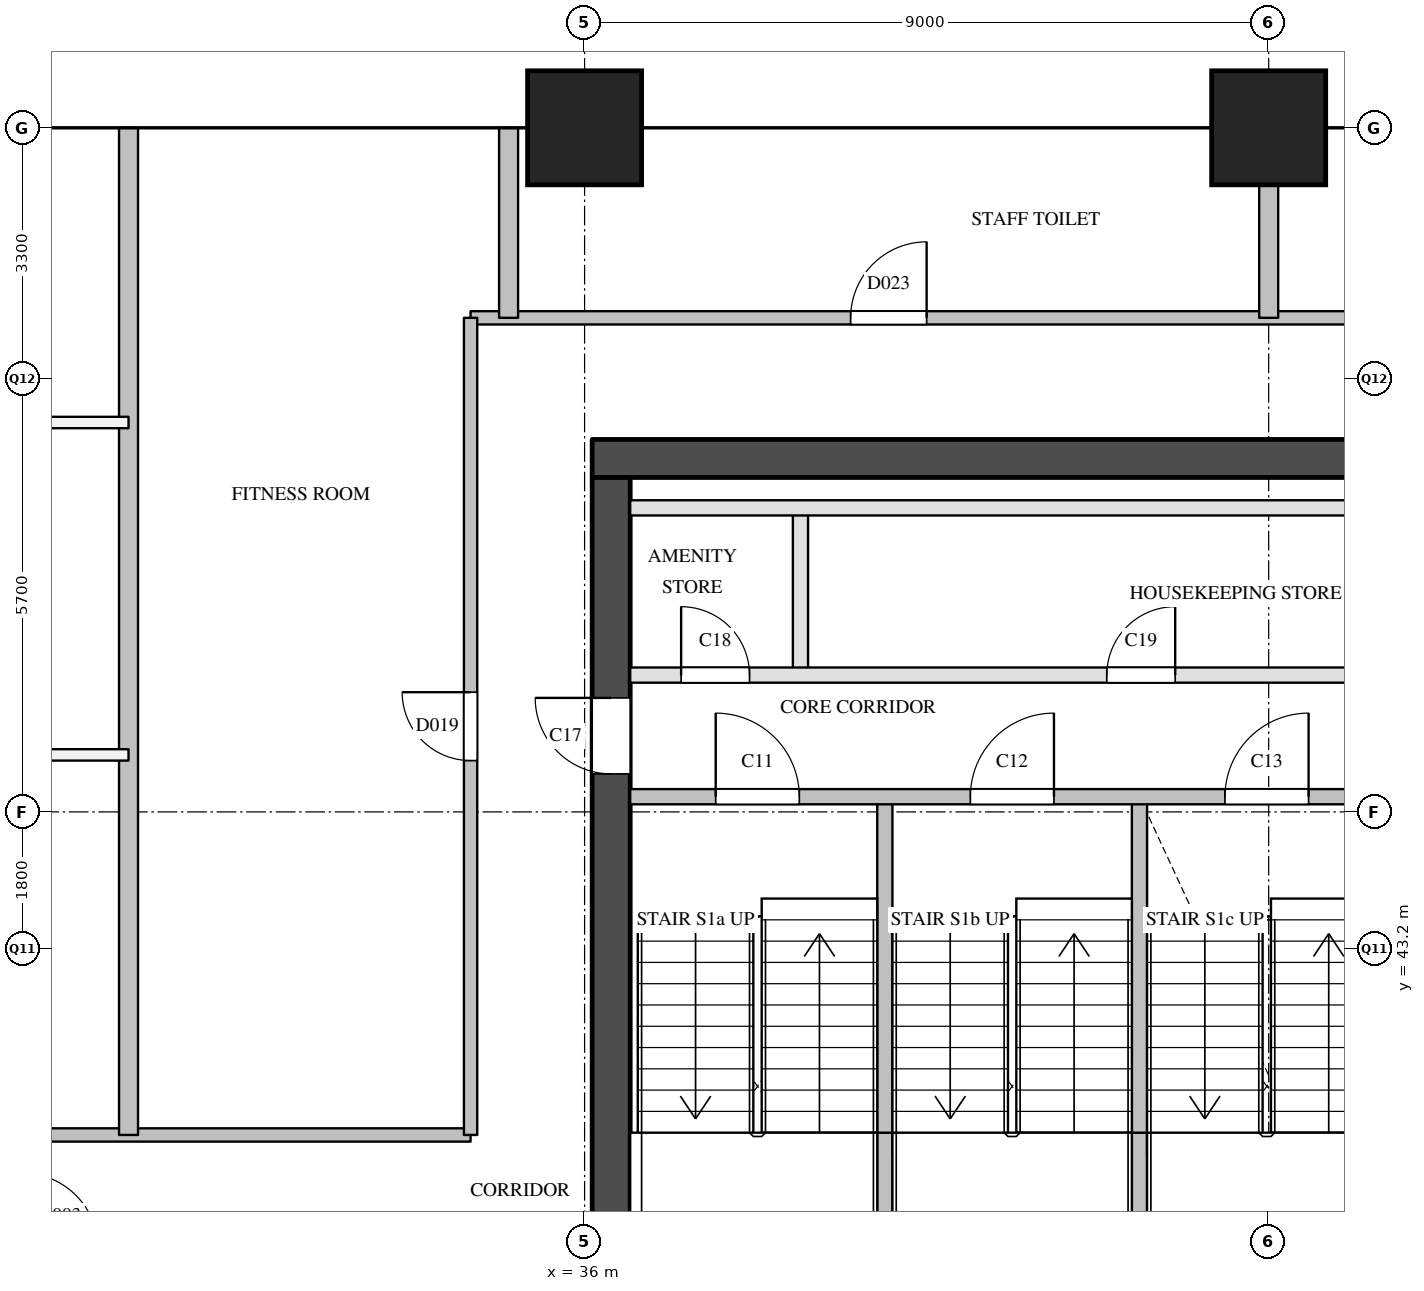
"""IFC4 building model, lengths in metres.
Left out: names, types, materials, properties, quantities, classifications, styles, units other than length and angle.
Written with IfcOpenShell. Run it as: python <this file> out.ifc"""

import sys

from ifc_helpers import new_model, si_unit, direction, frame, frame_2d, origin, origin_2d, place, context, subcontext, project, spatial, rectangle, extrude, element, fill, save


model = new_model("IFC4")
c1 = context("Model", 3, precision=1e-05, world=origin(), true_north=direction((0.0, 1.0)))
c2 = subcontext(c1, "Body", "Model", "MODEL_VIEW")
j1 = project(units=[si_unit("LENGTHUNIT", "METRE"), si_unit("PLANEANGLEUNIT", "RADIAN")], contexts=[c1])
p1 = place(None, origin())
s1 = spatial("IfcSite", under=j1, at=p1, CompositionType="ELEMENT")
p2 = place(p1, origin())
s2 = spatial("IfcBuilding", under=s1, at=p2, CompositionType="ELEMENT")
p3 = place(p2, frame((0.0, 0.0, 134.9)))
s3 = spatial("IfcBuildingStorey", under=s2, at=p3, CompositionType="ELEMENT", Elevation=134.9)
for number, where, z_axis, x_axis in (
    (1, (36.0, 54.0, 0.0), (0.0, 0.0, 1.0), (1.0, 0.0, 0.0)),
    (2, (45.0, 54.0, 0.0), (0.0, 0.0, 1.0), (1.0, 0.0, 0.0)),
):
    element("IfcColumn", number, at=place(p3, frame(where, z_axis=z_axis, x_axis=x_axis)), inside=s3, PredefinedType="COLUMN", context=c2, shape_type="SweptSolid", body=[
        extrude(rectangle(XDim=1.5, YDim=1.5, at=origin_2d()), origin(), (0.0, 0.0, 1.0), 3.9),
    ])
p4 = place(p3, frame((36.1, 49.65, 0.0), z_axis=(0.0, 0.0, 1.0), x_axis=(1.0, 0.0, 0.0)))
e3 = element("IfcWall", 3, at=p4, inside=s3, PredefinedType="SHEAR", context=c2, shape_type="SweptSolid", body=[
    extrude(rectangle(XDim=12.2, YDim=0.5, at=frame_2d((6.1, 0.0))), origin(), (0.0, 0.0, 1.0), 3.6),
])
p5 = place(p3, frame((36.35, 29.1, 0.0), z_axis=(0.0, 0.0, 1.0), x_axis=(0.0, 1.0, 0.0)))
e4 = element("IfcWall", 4, at=p5, inside=s3, PredefinedType="SHEAR", context=c2, shape_type="SweptSolid", body=[
    extrude(rectangle(XDim=20.3, YDim=0.5, at=frame_2d((10.15, 0.0))), origin(), (0.0, 0.0, 1.0), 3.6),
])
p6 = place(p5, frame((3.6, 0.0, 0.0)))
e5 = element("IfcOpeningElement", 5, at=p6, cuts=e4, PredefinedType="OPENING", context=c2, shape_type="SweptSolid", body=[
    extrude(rectangle(XDim=1.8, YDim=2.1, at=frame_2d((0.9, 1.05))), frame((0.0, 0.26, 0.0), z_axis=(0.0, -1.0, 0.0), x_axis=(1.0, 0.0, 0.0)), (0.0, 0.0, 1.0), 0.52),
])
p7 = place(p5, frame((16.4, 0.0, 0.0)))
e6 = element("IfcOpeningElement", 6, at=p7, cuts=e4, PredefinedType="OPENING", context=c2, shape_type="SweptSolid", body=[
    extrude(rectangle(XDim=1.0, YDim=2.1, at=frame_2d((0.5, 1.05))), frame((0.0, 0.26, 0.0), z_axis=(0.0, -1.0, 0.0), x_axis=(1.0, 0.0, 0.0)), (0.0, 0.0, 1.0), 0.52),
])
p8 = place(p3, frame((38.84, 46.8, 0.0), z_axis=(0.0, 0.0, 1.0), x_axis=(0.0, 1.0, 0.0)))
e7 = element("IfcWall", 7, at=p8, inside=s3, PredefinedType="PARTITIONING", context=c2, shape_type="SweptSolid", body=[
    extrude(rectangle(XDim=2.2, YDim=0.2, at=frame_2d((1.1, 0.0))), origin(), (0.0, 0.0, 1.0), 3.6),
])
p9 = place(p3, frame((39.95, 39.0, 0.0), z_axis=(0.0, 0.0, 1.0), x_axis=(0.0, 1.0, 0.0)))
e8 = element("IfcWall", 8, at=p9, inside=s3, PredefinedType="SOLIDWALL", context=c2, shape_type="SweptSolid", body=[
    extrude(rectangle(XDim=1.78, YDim=0.2, at=frame_2d((0.89, 0.0))), origin(), (0.0, 0.0, 1.0), 3.6),
])
p10 = place(p3, frame((39.95, 40.78, 0.0), z_axis=(0.0, 0.0, 1.0), x_axis=(0.0, 1.0, 0.0)))
e9 = element("IfcWall", 9, at=p10, inside=s3, PredefinedType="SOLIDWALL", context=c2, shape_type="SweptSolid", body=[
    extrude(rectangle(XDim=4.42, YDim=0.2, at=frame_2d((2.21, 0.0))), origin(), (0.0, 0.0, 1.0), 3.6),
])
p11 = place(p3, frame((43.3, 39.0, 0.0), z_axis=(0.0, 0.0, 1.0), x_axis=(0.0, 1.0, 0.0)))
e10 = element("IfcWall", 10, at=p11, inside=s3, PredefinedType="SOLIDWALL", context=c2, shape_type="SweptSolid", body=[
    extrude(rectangle(XDim=1.78, YDim=0.2, at=frame_2d((0.89, 0.0))), origin(), (0.0, 0.0, 1.0), 3.6),
])
p12 = place(p3, frame((43.3, 40.78, 0.0), z_axis=(0.0, 0.0, 1.0), x_axis=(0.0, 1.0, 0.0)))
e11 = element("IfcWall", 11, at=p12, inside=s3, PredefinedType="SOLIDWALL", context=c2, shape_type="SweptSolid", body=[
    extrude(rectangle(XDim=4.42, YDim=0.2, at=frame_2d((2.21, 0.0))), origin(), (0.0, 0.0, 1.0), 3.6),
])
p13 = place(p3, frame((36.6, 45.2, 0.0), z_axis=(0.0, 0.0, 1.0), x_axis=(1.0, 0.0, 0.0)))
e12 = element("IfcWall", 12, at=p13, inside=s3, PredefinedType="SOLIDWALL", context=c2, shape_type="SweptSolid", body=[
    extrude(rectangle(XDim=10.05, YDim=0.2, at=frame_2d((5.025, 0.0))), origin(), (0.0, 0.0, 1.0), 3.6),
])
p14 = place(p13, frame((1.125, 0.0, 0.0)))
e13 = element("IfcOpeningElement", 13, at=p14, cuts=e12, PredefinedType="OPENING", context=c2, shape_type="SweptSolid", body=[
    extrude(rectangle(XDim=1.1, YDim=2.1, at=frame_2d((0.55, 1.05))), frame((0.0, 0.11, 0.0), z_axis=(0.0, -1.0, 0.0), x_axis=(1.0, 0.0, 0.0)), (0.0, 0.0, 1.0), 0.22),
])
p15 = place(p13, frame((4.475, 0.0, 0.0)))
e14 = element("IfcOpeningElement", 14, at=p15, cuts=e12, PredefinedType="OPENING", context=c2, shape_type="SweptSolid", body=[
    extrude(rectangle(XDim=1.1, YDim=2.1, at=frame_2d((0.55, 1.05))), frame((0.0, 0.11, 0.0), z_axis=(0.0, -1.0, 0.0), x_axis=(1.0, 0.0, 0.0)), (0.0, 0.0, 1.0), 0.22),
])
p16 = place(p13, frame((7.825, 0.0, 0.0)))
e15 = element("IfcOpeningElement", 15, at=p16, cuts=e12, PredefinedType="OPENING", context=c2, shape_type="SweptSolid", body=[
    extrude(rectangle(XDim=1.1, YDim=2.1, at=frame_2d((0.55, 1.05))), frame((0.0, 0.11, 0.0), z_axis=(0.0, -1.0, 0.0), x_axis=(1.0, 0.0, 0.0)), (0.0, 0.0, 1.0), 0.22),
])
p17 = place(p3, frame((36.6, 46.8, 0.0), z_axis=(0.0, 0.0, 1.0), x_axis=(1.0, 0.0, 0.0)))
e16 = element("IfcWall", 16, at=p17, inside=s3, PredefinedType="PARTITIONING", context=c2, shape_type="SweptSolid", body=[
    extrude(rectangle(XDim=11.2, YDim=0.2, at=frame_2d((5.6, 0.0))), origin(), (0.0, 0.0, 1.0), 3.6),
])
p18 = place(p17, frame((0.67, 0.0, 0.0)))
e17 = element("IfcOpeningElement", 17, at=p18, cuts=e16, PredefinedType="OPENING", context=c2, shape_type="SweptSolid", body=[
    extrude(rectangle(XDim=0.9, YDim=2.1, at=frame_2d((0.45, 1.05))), frame((0.0, 0.11, 0.0), z_axis=(0.0, -1.0, 0.0), x_axis=(1.0, 0.0, 0.0)), (0.0, 0.0, 1.0), 0.22),
])
p19 = place(p17, frame((6.27, 0.0, 0.0)))
e18 = element("IfcOpeningElement", 18, at=p19, cuts=e16, PredefinedType="OPENING", context=c2, shape_type="SweptSolid", body=[
    extrude(rectangle(XDim=0.9, YDim=2.1, at=frame_2d((0.45, 1.05))), frame((0.0, 0.11, 0.0), z_axis=(0.0, -1.0, 0.0), x_axis=(1.0, 0.0, 0.0)), (0.0, 0.0, 1.0), 0.22),
])
p20 = place(p3, frame((36.6, 49.0, 0.0), z_axis=(0.0, 0.0, 1.0), x_axis=(1.0, 0.0, 0.0)))
e19 = element("IfcWall", 19, at=p20, inside=s3, PredefinedType="PARTITIONING", context=c2, shape_type="SweptSolid", body=[
    extrude(rectangle(XDim=11.2, YDim=0.2, at=frame_2d((5.6, 0.0))), origin(), (0.0, 0.0, 1.0), 3.6),
])
p21 = place(p3, frame((19.5, 40.75, 0.0), z_axis=(0.0, 0.0, 1.0), x_axis=(1.0, 0.0, 0.0)))
e20 = element("IfcWall", 20, at=p21, inside=s3, PredefinedType="PARTITIONING", context=c2, shape_type="SweptSolid", body=[
    extrude(rectangle(XDim=15.0, YDim=0.175, at=frame_2d((7.5, 0.0))), origin(), (0.0, 0.0, 1.0), 2.6),
])
p22 = place(p21, frame((0.7, 0.0, 0.0)))
e21 = element("IfcOpeningElement", 21, at=p22, cuts=e20, PredefinedType="OPENING", context=c2, shape_type="SweptSolid", body=[
    extrude(rectangle(XDim=1.0, YDim=2.1, at=frame_2d((0.5, 1.05))), frame((0.0, 0.097, 0.0), z_axis=(0.0, -1.0, 0.0), x_axis=(1.0, 0.0, 0.0)), (0.0, 0.0, 1.0), 0.195),
])
p23 = place(p3, frame((34.5, 51.5, 0.0), z_axis=(0.0, 0.0, 1.0), x_axis=(1.0, 0.0, 0.0)))
e22 = element("IfcWall", 22, at=p23, inside=s3, PredefinedType="PARTITIONING", context=c2, shape_type="SweptSolid", body=[
    extrude(rectangle(XDim=15.4, YDim=0.175, at=frame_2d((7.7, 0.0))), origin(), (0.0, 0.0, 1.0), 3.6),
])
p24 = place(p23, frame((5.0, 0.0, 0.0)))
e23 = element("IfcOpeningElement", 23, at=p24, cuts=e22, PredefinedType="OPENING", context=c2, shape_type="SweptSolid", body=[
    extrude(rectangle(XDim=1.0, YDim=2.1, at=frame_2d((0.5, 1.05))), frame((0.0, 0.097, 0.0), z_axis=(0.0, -1.0, 0.0), x_axis=(1.0, 0.0, 0.0)), (0.0, 0.0, 1.0), 0.195),
])
p25 = place(p3, frame((34.5, 40.75, 0.0), z_axis=(0.0, 0.0, 1.0), x_axis=(0.0, 1.0, 0.0)))
e24 = element("IfcWall", 24, at=p25, inside=s3, PredefinedType="PARTITIONING", context=c2, shape_type="SweptSolid", body=[
    extrude(rectangle(XDim=10.75, YDim=0.175, at=frame_2d((5.375, 0.0))), origin(), (0.0, 0.0, 1.0), 3.6),
])
p26 = place(p25, frame((4.925, 0.0, 0.0)))
e25 = element("IfcOpeningElement", 25, at=p26, cuts=e24, PredefinedType="OPENING", context=c2, shape_type="SweptSolid", body=[
    extrude(rectangle(XDim=0.9, YDim=2.1, at=frame_2d((0.45, 1.05))), frame((0.0, 0.097, 0.0), z_axis=(0.0, -1.0, 0.0), x_axis=(1.0, 0.0, 0.0)), (0.0, 0.0, 1.0), 0.195),
])
p27 = place(p3, frame((21.9, 45.75, 0.0), z_axis=(0.0, 0.0, 1.0), x_axis=(1.0, 0.0, 0.0)))
e26 = element("IfcWall", 26, at=p27, inside=s3, PredefinedType="PARTITIONING", context=c2, shape_type="SweptSolid", body=[
    extrude(rectangle(XDim=8.1, YDim=0.15, at=frame_2d((4.05, 0.0))), origin(), (0.0, 0.0, 1.0), 2.6),
])
p28 = place(p27, frame((2.26, 0.0, 0.0)))
e27 = element("IfcOpeningElement", 27, at=p28, cuts=e26, PredefinedType="OPENING", context=c2, shape_type="SweptSolid", body=[
    extrude(rectangle(XDim=0.9, YDim=2.1, at=frame_2d((0.45, 1.05))), frame((0.0, 0.085, 0.0), z_axis=(0.0, -1.0, 0.0), x_axis=(1.0, 0.0, 0.0)), (0.0, 0.0, 1.0), 0.17),
])
p29 = place(p3, frame((21.9, 50.123, 0.0), z_axis=(0.0, 0.0, 1.0), x_axis=(1.0, 0.0, 0.0)))
e28 = element("IfcWall", 28, at=p29, inside=s3, PredefinedType="PARTITIONING", context=c2, shape_type="SweptSolid", body=[
    extrude(rectangle(XDim=8.1, YDim=0.15, at=frame_2d((4.05, 0.0))), origin(), (0.0, 0.0, 1.0), 2.6),
])
p30 = place(p29, frame((3.6, 0.0, 0.0)))
e29 = element("IfcOpeningElement", 29, at=p30, cuts=e28, PredefinedType="OPENING", context=c2, shape_type="SweptSolid", body=[
    extrude(rectangle(XDim=0.9, YDim=2.1, at=frame_2d((0.45, 1.05))), frame((0.0, 0.085, 0.0), z_axis=(0.0, -1.0, 0.0), x_axis=(1.0, 0.0, 0.0)), (0.0, 0.0, 1.0), 0.17),
])
p31 = place(p3, frame((30.0, 40.75, 0.0), z_axis=(0.0, 0.0, 1.0), x_axis=(0.0, 1.0, 0.0)))
e30 = element("IfcWall", 30, at=p31, inside=s3, PredefinedType="PARTITIONING", context=c2, shape_type="SweptSolid", body=[
    extrude(rectangle(XDim=13.25, YDim=0.25, at=frame_2d((6.625, 0.0))), origin(), (0.0, 0.0, 1.0), 2.6),
])
p32 = place(p3, frame((35.0, 51.5, 0.0), z_axis=(0.0, 0.0, 1.0), x_axis=(0.0, 1.0, 0.0)))
e31 = element("IfcWall", 31, at=p32, inside=s3, PredefinedType="PARTITIONING", context=c2, shape_type="SweptSolid", body=[
    extrude(rectangle(XDim=2.5, YDim=0.25, at=frame_2d((1.25, 0.0))), origin(), (0.0, 0.0, 1.0), 2.6),
])
p33 = place(p3, frame((45.0, 51.5, 0.0), z_axis=(0.0, 0.0, 1.0), x_axis=(0.0, 1.0, 0.0)))
e32 = element("IfcWall", 32, at=p33, inside=s3, PredefinedType="PARTITIONING", context=c2, shape_type="SweptSolid", body=[
    extrude(rectangle(XDim=2.5, YDim=0.25, at=frame_2d((1.25, 0.0))), origin(), (0.0, 0.0, 1.0), 3.6),
])
p34 = place(p14, origin())
e33 = element("IfcDoor", 33, at=p34, inside=s3, OperationType="SINGLE_SWING_LEFT", PredefinedType="DOOR", context=c2, shape_type="SweptSolid", body=[
    extrude(rectangle(XDim=1.1, YDim=2.1, at=frame_2d((0.55, 1.05))), frame((0.0, 0.025, 0.0), z_axis=(0.0, -1.0, 0.0), x_axis=(1.0, 0.0, 0.0)), (0.0, 0.0, 1.0), 0.05),
])
fill(e13, e33)
p35 = place(p15, origin())
e34 = element("IfcDoor", 34, at=p35, inside=s3, OperationType="SINGLE_SWING_RIGHT", PredefinedType="DOOR", context=c2, shape_type="SweptSolid", body=[
    extrude(rectangle(XDim=1.1, YDim=2.1, at=frame_2d((0.55, 1.05))), frame((0.0, 0.025, 0.0), z_axis=(0.0, -1.0, 0.0), x_axis=(1.0, 0.0, 0.0)), (0.0, 0.0, 1.0), 0.05),
])
fill(e14, e34)
p36 = place(p16, origin())
e35 = element("IfcDoor", 35, at=p36, inside=s3, OperationType="SINGLE_SWING_RIGHT", PredefinedType="DOOR", context=c2, shape_type="SweptSolid", body=[
    extrude(rectangle(XDim=1.1, YDim=2.1, at=frame_2d((0.55, 1.05))), frame((0.0, 0.025, 0.0), z_axis=(0.0, -1.0, 0.0), x_axis=(1.0, 0.0, 0.0)), (0.0, 0.0, 1.0), 0.05),
])
fill(e15, e35)
p37 = place(p7, origin())
e36 = element("IfcDoor", 36, at=p37, inside=s3, OperationType="SINGLE_SWING_RIGHT", PredefinedType="DOOR", context=c2, shape_type="SweptSolid", body=[
    extrude(rectangle(XDim=1.0, YDim=2.1, at=frame_2d((0.5, 1.05))), frame((0.0, 0.025, 0.0), z_axis=(0.0, -1.0, 0.0), x_axis=(1.0, 0.0, 0.0)), (0.0, 0.0, 1.0), 0.05),
])
fill(e6, e36)
p38 = place(p18, origin())
e37 = element("IfcDoor", 37, at=p38, inside=s3, OperationType="SINGLE_SWING_LEFT", PredefinedType="DOOR", context=c2, shape_type="SweptSolid", body=[
    extrude(rectangle(XDim=0.9, YDim=2.1, at=frame_2d((0.45, 1.05))), frame((0.0, 0.025, 0.0), z_axis=(0.0, -1.0, 0.0), x_axis=(1.0, 0.0, 0.0)), (0.0, 0.0, 1.0), 0.05),
])
fill(e17, e37)
p39 = place(p19, origin())
e38 = element("IfcDoor", 38, at=p39, inside=s3, OperationType="SINGLE_SWING_RIGHT", PredefinedType="DOOR", context=c2, shape_type="SweptSolid", body=[
    extrude(rectangle(XDim=0.9, YDim=2.1, at=frame_2d((0.45, 1.05))), frame((0.0, 0.025, 0.0), z_axis=(0.0, -1.0, 0.0), x_axis=(1.0, 0.0, 0.0)), (0.0, 0.0, 1.0), 0.05),
])
fill(e18, e38)
p40 = place(p26, origin())
e39 = element("IfcDoor", 39, at=p40, inside=s3, OperationType="SINGLE_SWING_RIGHT", PredefinedType="DOOR", context=c2, shape_type="SweptSolid", body=[
    extrude(rectangle(XDim=0.9, YDim=2.1, at=frame_2d((0.45, 1.05))), frame((0.0, 0.025, 0.0), z_axis=(0.0, -1.0, 0.0), x_axis=(1.0, 0.0, 0.0)), (0.0, 0.0, 1.0), 0.05),
])
fill(e25, e39)
p41 = place(p24, origin())
e40 = element("IfcDoor", 40, at=p41, inside=s3, OperationType="SINGLE_SWING_RIGHT", PredefinedType="DOOR", context=c2, shape_type="SweptSolid", body=[
    extrude(rectangle(XDim=1.0, YDim=2.1, at=frame_2d((0.5, 1.05))), frame((0.0, 0.025, 0.0), z_axis=(0.0, -1.0, 0.0), x_axis=(1.0, 0.0, 0.0)), (0.0, 0.0, 1.0), 0.05),
])
fill(e23, e40)
save(model, sys.argv[1])
